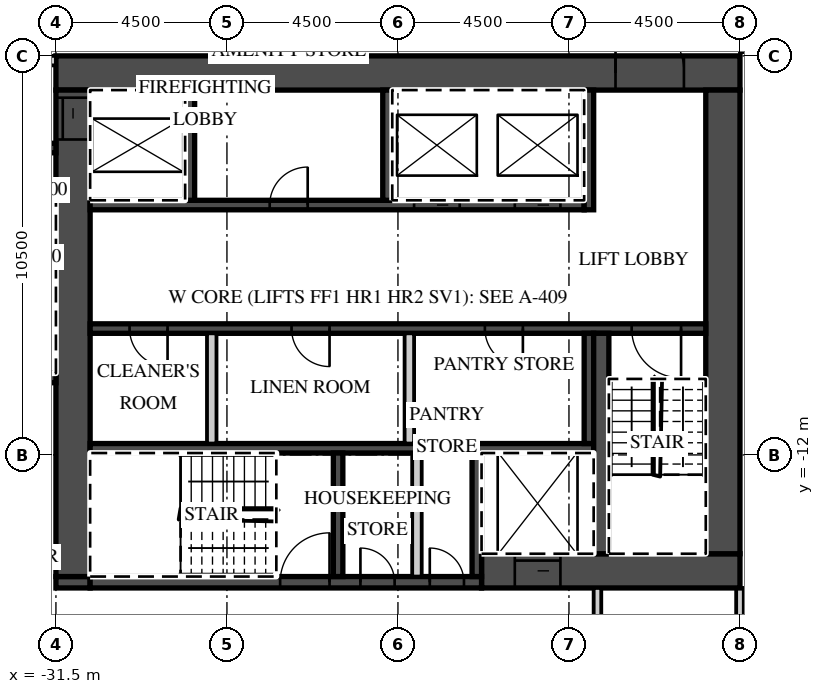
"""IFC4 building model, lengths in metres.
Left out: names, types, materials, properties, quantities, classifications, styles, units other than length and angle.
Written with IfcOpenShell. Run it as: python <this file> out.ifc"""

import sys

from ifc_helpers import new_model, si_unit, direction, frame, frame_2d, origin, place, context, subcontext, project, spatial, rectangle, extrude, element, fill, save


model = new_model("IFC4")
c1 = context("Model", 3, precision=1e-05, world=origin(), true_north=direction((0.0, 1.0)))
c2 = subcontext(c1, "Body", "Model", "MODEL_VIEW")
j1 = project(units=[si_unit("LENGTHUNIT", "METRE"), si_unit("PLANEANGLEUNIT", "RADIAN")], contexts=[c1])
p1 = place(None, origin())
s1 = spatial("IfcSite", under=j1, at=p1, CompositionType="ELEMENT")
p2 = place(p1, origin())
s2 = spatial("IfcBuilding", under=s1, at=p2, CompositionType="ELEMENT")
p3 = place(p2, frame((0.0, 0.0, 304.8)))
s3 = spatial("IfcBuildingStorey", under=s2, at=p3, CompositionType="ELEMENT", Elevation=304.8)
p4 = place(p3, frame((-13.5, -21.396, 0.0), z_axis=(0.0, 0.0, 1.0), x_axis=(0.0, 1.0, 0.0)))
e1 = element("IfcWall", 1, at=p4, inside=s3, PredefinedType="PARTITIONING", context=c2, shape_type="SweptSolid", body=[
    extrude(rectangle(XDim=5.896, YDim=0.2, at=frame_2d((2.948, 0.0))), origin(), (0.0, 0.0, 1.0), 2.9),
])
p5 = place(p3, frame((-13.5, -1.3, 0.0), z_axis=(0.0, 0.0, 1.0), x_axis=(1.0, 0.0, 0.0)))
e2 = element("IfcWall", 2, at=p5, inside=s3, PredefinedType="PARTITIONING", context=c2, shape_type="SweptSolid", body=[
    extrude(rectangle(XDim=50.293, YDim=0.2, at=frame_2d((25.146, 0.0))), origin(), (0.0, 0.0, 1.0), 2.9),
])
p6 = place(p5, frame((0.575, 0.0, 0.0)))
e3 = element("IfcOpeningElement", 3, at=p6, cuts=e2, PredefinedType="OPENING", context=c2, shape_type="SweptSolid", body=[
    extrude(rectangle(XDim=1.0, YDim=2.1, at=frame_2d((0.5, 1.05))), frame((0.0, 0.11, 0.0), z_axis=(0.0, -1.0, 0.0), x_axis=(1.0, 0.0, 0.0)), (0.0, 0.0, 1.0), 0.22),
])
p7 = place(p5, frame((6.938, 0.0, 0.0)))
e4 = element("IfcOpeningElement", 4, at=p7, cuts=e2, PredefinedType="OPENING", context=c2, shape_type="SweptSolid", body=[
    extrude(rectangle(XDim=1.2, YDim=2.1, at=frame_2d((0.6, 1.05))), frame((0.0, 0.11, 0.0), z_axis=(0.0, -1.0, 0.0), x_axis=(1.0, 0.0, 0.0)), (0.0, 0.0, 1.0), 0.22),
])
p8 = place(p5, frame((16.45, 0.0, 0.0)))
e5 = element("IfcOpeningElement", 5, at=p8, cuts=e2, PredefinedType="OPENING", context=c2, shape_type="SweptSolid", body=[
    extrude(rectangle(XDim=1.0, YDim=2.1, at=frame_2d((0.5, 1.05))), frame((0.0, 0.11, 0.0), z_axis=(0.0, -1.0, 0.0), x_axis=(1.0, 0.0, 0.0)), (0.0, 0.0, 1.0), 0.22),
])
p9 = place(p5, frame((20.925, 0.0, 0.0)))
e6 = element("IfcOpeningElement", 6, at=p9, cuts=e2, PredefinedType="OPENING", context=c2, shape_type="SweptSolid", body=[
    extrude(rectangle(XDim=1.0, YDim=2.1, at=frame_2d((0.5, 1.05))), frame((0.0, 0.11, 0.0), z_axis=(0.0, -1.0, 0.0), x_axis=(1.0, 0.0, 0.0)), (0.0, 0.0, 1.0), 0.22),
])
p10 = place(p5, frame((24.938, 0.0, 0.0)))
e7 = element("IfcOpeningElement", 7, at=p10, cuts=e2, PredefinedType="OPENING", context=c2, shape_type="SweptSolid", body=[
    extrude(rectangle(XDim=1.2, YDim=2.1, at=frame_2d((0.6, 1.05))), frame((0.0, 0.11, 0.0), z_axis=(0.0, -1.0, 0.0), x_axis=(1.0, 0.0, 0.0)), (0.0, 0.0, 1.0), 0.22),
])
p11 = place(p5, frame((32.075, 0.0, 0.0)))
e8 = element("IfcOpeningElement", 8, at=p11, cuts=e2, PredefinedType="OPENING", context=c2, shape_type="SweptSolid", body=[
    extrude(rectangle(XDim=1.0, YDim=2.1, at=frame_2d((0.5, 1.05))), frame((0.0, 0.11, 0.0), z_axis=(0.0, -1.0, 0.0), x_axis=(1.0, 0.0, 0.0)), (0.0, 0.0, 1.0), 0.22),
])
p12 = place(p5, frame((38.925, 0.0, 0.0)))
e9 = element("IfcOpeningElement", 9, at=p12, cuts=e2, PredefinedType="OPENING", context=c2, shape_type="SweptSolid", body=[
    extrude(rectangle(XDim=1.0, YDim=2.1, at=frame_2d((0.5, 1.05))), frame((0.0, 0.11, 0.0), z_axis=(0.0, -1.0, 0.0), x_axis=(1.0, 0.0, 0.0)), (0.0, 0.0, 1.0), 0.22),
])
p13 = place(p5, frame((45.862, 0.0, 0.0)))
e10 = element("IfcOpeningElement", 10, at=p13, cuts=e2, PredefinedType="OPENING", context=c2, shape_type="SweptSolid", body=[
    extrude(rectangle(XDim=1.2, YDim=2.1, at=frame_2d((0.6, 1.05))), frame((0.0, 0.11, 0.0), z_axis=(0.0, -1.0, 0.0), x_axis=(1.0, 0.0, 0.0)), (0.0, 0.0, 1.0), 0.22),
])
p14 = place(p3, frame((-31.5, -1.95, 0.0), z_axis=(0.0, 0.0, 1.0), x_axis=(1.0, 0.0, 0.0)))
e11 = element("IfcWall", 11, at=p14, inside=s3, PredefinedType="SHEAR", context=c2, shape_type="SweptSolid", body=[
    extrude(rectangle(XDim=18.0, YDim=0.9, at=frame_2d((9.0, 0.0))), origin(), (0.0, 0.0, 1.0), 2.9),
])
p15 = place(p14, frame((14.725, 0.0, 0.0)))
e12 = element("IfcOpeningElement", 12, at=p15, cuts=e11, PredefinedType="OPENING", context=c2, shape_type="SweptSolid", body=[
    extrude(rectangle(XDim=1.8, YDim=2.1, at=frame_2d((0.9, 1.05))), frame((0.0, 0.46, 0.0), z_axis=(0.0, -1.0, 0.0), x_axis=(1.0, 0.0, 0.0)), (0.0, 0.0, 1.0), 0.92),
])
p16 = place(p3, frame((-20.3, -15.05, 0.0), z_axis=(0.0, 0.0, 1.0), x_axis=(1.0, 0.0, 0.0)))
e13 = element("IfcWall", 13, at=p16, inside=s3, PredefinedType="SHEAR", context=c2, shape_type="SweptSolid", body=[
    extrude(rectangle(XDim=6.8, YDim=0.9, at=frame_2d((3.4, 0.0))), origin(), (0.0, 0.0, 1.0), 2.9),
])
p17 = place(p16, frame((0.875, 0.0, 0.0)))
e14 = element("IfcOpeningElement", 14, at=p17, cuts=e13, PredefinedType="OPENING", context=c2, shape_type="SweptSolid", body=[
    extrude(rectangle(XDim=1.2, YDim=2.1, at=frame_2d((0.6, 1.05))), frame((0.0, 0.46, 0.0), z_axis=(0.0, -1.0, 0.0), x_axis=(1.0, 0.0, 0.0)), (0.0, 0.0, 1.0), 0.92),
])
p18 = place(p3, frame((-31.5, -15.35, 0.0), z_axis=(0.0, 0.0, 1.0), x_axis=(1.0, 0.0, 0.0)))
e15 = element("IfcWall", 15, at=p18, inside=s3, PredefinedType="SHEAR", context=c2, shape_type="SweptSolid", body=[
    extrude(rectangle(XDim=0.9, YDim=0.3, at=frame_2d((0.45, 0.0))), origin(), (0.0, 0.0, 1.0), 2.9),
])
p19 = place(p3, frame((-30.6, -15.35, 0.0), z_axis=(0.0, 0.0, 1.0), x_axis=(1.0, 0.0, 0.0)))
e16 = element("IfcWall", 16, at=p19, inside=s3, PredefinedType="SHEAR", context=c2, shape_type="SweptSolid", body=[
    extrude(rectangle(XDim=10.3, YDim=0.3, at=frame_2d((5.15, 0.0))), origin(), (0.0, 0.0, 1.0), 2.9),
])
p20 = place(p19, frame((5.0, 0.0, 0.0)))
e17 = element("IfcOpeningElement", 17, at=p20, cuts=e16, PredefinedType="OPENING", context=c2, shape_type="SweptSolid", body=[
    extrude(rectangle(XDim=1.3, YDim=2.1, at=frame_2d((0.65, 1.05))), frame((0.0, 0.16, 0.0), z_axis=(0.0, -1.0, 0.0), x_axis=(1.0, 0.0, 0.0)), (0.0, 0.0, 1.0), 0.32),
])
p21 = place(p19, frame((7.113, 0.0, 0.0)))
e18 = element("IfcOpeningElement", 18, at=p21, cuts=e16, PredefinedType="OPENING", context=c2, shape_type="SweptSolid", body=[
    extrude(rectangle(XDim=0.9, YDim=2.1, at=frame_2d((0.45, 1.05))), frame((0.0, 0.16, 0.0), z_axis=(0.0, -1.0, 0.0), x_axis=(1.0, 0.0, 0.0)), (0.0, 0.0, 1.0), 0.32),
])
p22 = place(p19, frame((8.938, 0.0, 0.0)))
e19 = element("IfcOpeningElement", 19, at=p22, cuts=e16, PredefinedType="OPENING", context=c2, shape_type="SweptSolid", body=[
    extrude(rectangle(XDim=0.9, YDim=2.1, at=frame_2d((0.45, 1.05))), frame((0.0, 0.16, 0.0), z_axis=(0.0, -1.0, 0.0), x_axis=(1.0, 0.0, 0.0)), (0.0, 0.0, 1.0), 0.32),
])
p23 = place(p3, frame((-31.05, -15.2, 0.0), z_axis=(0.0, 0.0, 1.0), x_axis=(0.0, 1.0, 0.0)))
e20 = element("IfcWall", 20, at=p23, inside=s3, PredefinedType="SHEAR", context=c2, shape_type="SweptSolid", body=[
    extrude(rectangle(XDim=12.8, YDim=0.9, at=frame_2d((6.4, 0.0))), origin(), (0.0, 0.0, 1.0), 2.9),
])
p24 = place(p23, frame((11.5, 0.0, 0.0)))
e21 = element("IfcOpeningElement", 21, at=p24, cuts=e20, PredefinedType="OPENING", context=c2, shape_type="SweptSolid", body=[
    extrude(rectangle(XDim=1.1, YDim=2.1, at=frame_2d((0.55, 1.05))), frame((0.0, 0.46, 0.0), z_axis=(0.0, -1.0, 0.0), x_axis=(1.0, 0.0, 0.0)), (0.0, 0.0, 1.0), 0.92),
])
p25 = place(p3, frame((-13.95, -14.6, 0.0), z_axis=(0.0, 0.0, 1.0), x_axis=(0.0, 1.0, 0.0)))
e22 = element("IfcWall", 22, at=p25, inside=s3, PredefinedType="SHEAR", context=c2, shape_type="SweptSolid", body=[
    extrude(rectangle(XDim=12.2, YDim=0.9, at=frame_2d((6.1, 0.0))), origin(), (0.0, 0.0, 1.0), 2.9),
])
p26 = place(p3, frame((-30.6, -5.425, 0.0), z_axis=(0.0, 0.0, 1.0), x_axis=(1.0, 0.0, 0.0)))
e23 = element("IfcWall", 23, at=p26, inside=s3, PredefinedType="SHEAR", context=c2, shape_type="SweptSolid", body=[
    extrude(rectangle(XDim=13.0, YDim=0.25, at=frame_2d((6.5, 0.0))), origin(), (0.0, 0.0, 1.0), 2.9),
])
p27 = place(p26, frame((8.525, 0.0, 0.0)))
e24 = element("IfcOpeningElement", 24, at=p27, cuts=e23, PredefinedType="OPENING", context=c2, shape_type="SweptSolid", body=[
    extrude(rectangle(XDim=1.2, YDim=2.1, at=frame_2d((0.6, 1.05))), frame((0.0, 0.135, 0.0), z_axis=(0.0, -1.0, 0.0), x_axis=(1.0, 0.0, 0.0)), (0.0, 0.0, 1.0), 0.27),
])
p28 = place(p26, frame((11.175, 0.0, 0.0)))
e25 = element("IfcOpeningElement", 25, at=p28, cuts=e23, PredefinedType="OPENING", context=c2, shape_type="SweptSolid", body=[
    extrude(rectangle(XDim=1.2, YDim=2.1, at=frame_2d((0.6, 1.05))), frame((0.0, 0.135, 0.0), z_axis=(0.0, -1.0, 0.0), x_axis=(1.0, 0.0, 0.0)), (0.0, 0.0, 1.0), 0.27),
])
p29 = place(p26, frame((4.725, 0.0, 0.0)))
e26 = element("IfcOpeningElement", 26, at=p29, cuts=e23, PredefinedType="OPENING", context=c2, shape_type="SweptSolid", body=[
    extrude(rectangle(XDim=1.0, YDim=2.1, at=frame_2d((0.5, 1.05))), frame((0.0, 0.135, 0.0), z_axis=(0.0, -1.0, 0.0), x_axis=(1.0, 0.0, 0.0)), (0.0, 0.0, 1.0), 0.27),
])
p30 = place(p3, frame((-17.475, -5.55, 0.0), z_axis=(0.0, 0.0, 1.0), x_axis=(0.0, 1.0, 0.0)))
e27 = element("IfcWall", 27, at=p30, inside=s3, PredefinedType="SHEAR", context=c2, shape_type="SweptSolid", body=[
    extrude(rectangle(XDim=3.15, YDim=0.25, at=frame_2d((1.575, 0.0))), origin(), (0.0, 0.0, 1.0), 2.9),
])
for number, where, z_axis, x_axis in (
    (28, (-27.975, -5.3, 0.0), (0.0, 0.0, 1.0), (0.0, 1.0, 0.0)),
    (29, (-22.775, -5.3, 0.0), (0.0, 0.0, 1.0), (0.0, 1.0, 0.0)),
):
    element("IfcWall", number, at=place(p3, frame(where, z_axis=z_axis, x_axis=x_axis)), inside=s3, PredefinedType="SHEAR", context=c2, shape_type="SweptSolid", body=[
        extrude(rectangle(XDim=2.9, YDim=0.25, at=frame_2d((1.45, 0.0))), origin(), (0.0, 0.0, 1.0), 2.9),
    ])
p31 = place(p3, frame((-30.6, -8.675, 0.0), z_axis=(0.0, 0.0, 1.0), x_axis=(1.0, 0.0, 0.0)))
e30 = element("IfcWall", 30, at=p31, inside=s3, PredefinedType="SHEAR", context=c2, shape_type="SweptSolid", body=[
    extrude(rectangle(XDim=16.2, YDim=0.25, at=frame_2d((8.1, 0.0))), origin(), (0.0, 0.0, 1.0), 2.9),
])
p32 = place(p31, frame((14.25, 0.0, 0.0)))
e31 = element("IfcOpeningElement", 31, at=p32, cuts=e30, PredefinedType="OPENING", context=c2, shape_type="SweptSolid", body=[
    extrude(rectangle(XDim=1.3, YDim=2.1, at=frame_2d((0.65, 1.05))), frame((0.0, 0.135, 0.0), z_axis=(0.0, -1.0, 0.0), x_axis=(1.0, 0.0, 0.0)), (0.0, 0.0, 1.0), 0.27),
])
p33 = place(p31, frame((1.038, 0.0, 0.0)))
e32 = element("IfcOpeningElement", 32, at=p33, cuts=e30, PredefinedType="OPENING", context=c2, shape_type="SweptSolid", body=[
    extrude(rectangle(XDim=1.0, YDim=2.1, at=frame_2d((0.5, 1.05))), frame((0.0, 0.135, 0.0), z_axis=(0.0, -1.0, 0.0), x_axis=(1.0, 0.0, 0.0)), (0.0, 0.0, 1.0), 0.27),
])
p34 = place(p31, frame((5.3, 0.0, 0.0)))
e33 = element("IfcOpeningElement", 33, at=p34, cuts=e30, PredefinedType="OPENING", context=c2, shape_type="SweptSolid", body=[
    extrude(rectangle(XDim=1.0, YDim=2.1, at=frame_2d((0.5, 1.05))), frame((0.0, 0.135, 0.0), z_axis=(0.0, -1.0, 0.0), x_axis=(1.0, 0.0, 0.0)), (0.0, 0.0, 1.0), 0.27),
])
p35 = place(p31, frame((10.387, 0.0, 0.0)))
e34 = element("IfcOpeningElement", 34, at=p35, cuts=e30, PredefinedType="OPENING", context=c2, shape_type="SweptSolid", body=[
    extrude(rectangle(XDim=1.0, YDim=2.1, at=frame_2d((0.5, 1.05))), frame((0.0, 0.135, 0.0), z_axis=(0.0, -1.0, 0.0), x_axis=(1.0, 0.0, 0.0)), (0.0, 0.0, 1.0), 0.27),
])
p36 = place(p3, frame((-30.6, -11.825, 0.0), z_axis=(0.0, 0.0, 1.0), x_axis=(1.0, 0.0, 0.0)))
e35 = element("IfcWall", 35, at=p36, inside=s3, PredefinedType="SHEAR", context=c2, shape_type="SweptSolid", body=[
    extrude(rectangle(XDim=13.25, YDim=0.25, at=frame_2d((6.625, 0.0))), origin(), (0.0, 0.0, 1.0), 2.9),
])
p37 = place(p3, frame((-17.475, -11.7, 0.0), z_axis=(0.0, 0.0, 1.0), x_axis=(0.0, 1.0, 0.0)))
e36 = element("IfcWall", 36, at=p37, inside=s3, PredefinedType="SHEAR", context=c2, shape_type="SweptSolid", body=[
    extrude(rectangle(XDim=2.9, YDim=0.25, at=frame_2d((1.45, 0.0))), origin(), (0.0, 0.0, 1.0), 2.9),
])
for number, where, z_axis, x_axis in (
    (37, (-27.4, -11.7, 0.0), (0.0, 0.0, 1.0), (0.0, 1.0, 0.0)),
    (38, (-22.2, -11.7, 0.0), (0.0, 0.0, 1.0), (0.0, 1.0, 0.0)),
):
    element("IfcWall", number, at=place(p3, frame(where, z_axis=z_axis, x_axis=x_axis)), inside=s3, PredefinedType="PARTITIONING", context=c2, shape_type="SweptSolid", body=[
        extrude(rectangle(XDim=2.9, YDim=0.25, at=frame_2d((1.45, 0.0))), origin(), (0.0, 0.0, 1.0), 2.9),
    ])
p38 = place(p3, frame((-17.15, -14.6, 0.0), z_axis=(0.0, 0.0, 1.0), x_axis=(0.0, 1.0, 0.0)))
e39 = element("IfcWall", 39, at=p38, inside=s3, PredefinedType="SHEAR", context=c2, shape_type="SweptSolid", body=[
    extrude(rectangle(XDim=5.8, YDim=0.4, at=frame_2d((2.9, 0.0))), origin(), (0.0, 0.0, 1.0), 2.9),
])
for number, where, z_axis, x_axis in (
    (40, (-20.425, -15.2, 0.0), (0.0, 0.0, 1.0), (0.0, 1.0, 0.0)),
    (41, (-24.075, -15.2, 0.0), (0.0, 0.0, 1.0), (0.0, 1.0, 0.0)),
):
    element("IfcWall", number, at=place(p3, frame(where, z_axis=z_axis, x_axis=x_axis)), inside=s3, PredefinedType="SHEAR", context=c2, shape_type="SweptSolid", body=[
        extrude(rectangle(XDim=3.25, YDim=0.25, at=frame_2d((1.625, 0.0))), origin(), (0.0, 0.0, 1.0), 2.9),
    ])
p39 = place(p3, frame((-22.0, -15.2, 0.0), z_axis=(0.0, 0.0, 1.0), x_axis=(0.0, 1.0, 0.0)))
e42 = element("IfcWall", 42, at=p39, inside=s3, PredefinedType="PARTITIONING", context=c2, shape_type="SweptSolid", body=[
    extrude(rectangle(XDim=3.25, YDim=0.25, at=frame_2d((1.625, 0.0))), origin(), (0.0, 0.0, 1.0), 2.9),
])
p40 = place(p3, frame((-39.627, -1.625, 0.0), z_axis=(0.0, 0.0, 1.0), x_axis=(1.0, 0.0, 0.0)))
e43 = element("IfcWall", 43, at=p40, inside=s3, PredefinedType="PARTITIONING", context=c2, shape_type="SweptSolid", body=[
    extrude(rectangle(XDim=8.127, YDim=0.25, at=frame_2d((4.063, 0.0))), origin(), (0.0, 0.0, 1.0), 2.9),
])
p41 = place(p40, frame((6.202, 0.0, 0.0)))
e44 = element("IfcOpeningElement", 44, at=p41, cuts=e43, PredefinedType="OPENING", context=c2, shape_type="SweptSolid", body=[
    extrude(rectangle(XDim=1.3, YDim=2.1, at=frame_2d((0.65, 1.05))), frame((0.0, 0.135, 0.0), z_axis=(0.0, -1.0, 0.0), x_axis=(1.0, 0.0, 0.0)), (0.0, 0.0, 1.0), 0.27),
])
p42 = place(p40, frame((3.777, 0.0, 0.0)))
e45 = element("IfcOpeningElement", 45, at=p42, cuts=e43, PredefinedType="OPENING", context=c2, shape_type="SweptSolid", body=[
    extrude(rectangle(XDim=1.1, YDim=2.1, at=frame_2d((0.55, 1.05))), frame((0.0, 0.135, 0.0), z_axis=(0.0, -1.0, 0.0), x_axis=(1.0, 0.0, 0.0)), (0.0, 0.0, 1.0), 0.27),
])
p43 = place(p3, frame((-34.05, -3.925, 0.0), z_axis=(0.0, 0.0, 1.0), x_axis=(1.0, 0.0, 0.0)))
e46 = element("IfcWall", 46, at=p43, inside=s3, PredefinedType="SHEAR", context=c2, shape_type="SweptSolid", body=[
    extrude(rectangle(XDim=2.55, YDim=0.25, at=frame_2d((1.275, 0.0))), origin(), (0.0, 0.0, 1.0), 2.9),
])
p44 = place(p43, frame((0.625, 0.0, 0.0)))
e47 = element("IfcOpeningElement", 47, at=p44, cuts=e46, PredefinedType="OPENING", context=c2, shape_type="SweptSolid", body=[
    extrude(rectangle(XDim=1.3, YDim=2.1, at=frame_2d((0.65, 1.05))), frame((0.0, 0.135, 0.0), z_axis=(0.0, -1.0, 0.0), x_axis=(1.0, 0.0, 0.0)), (0.0, 0.0, 1.0), 0.27),
])
p45 = place(p3, frame((-34.05, -9.975, 0.0), z_axis=(0.0, 0.0, 1.0), x_axis=(1.0, 0.0, 0.0)))
e48 = element("IfcWall", 48, at=p45, inside=s3, PredefinedType="SHEAR", context=c2, shape_type="SweptSolid", body=[
    extrude(rectangle(XDim=2.55, YDim=0.25, at=frame_2d((1.275, 0.0))), origin(), (0.0, 0.0, 1.0), 2.9),
])
p46 = place(p3, frame((-17.25, -17.7, 0.0), z_axis=(0.0, 0.0, 1.0), x_axis=(0.0, 1.0, 0.0)))
e49 = element("IfcWall", 49, at=p46, inside=s3, PredefinedType="PARTITIONING", context=c2, shape_type="SweptSolid", body=[
    extrude(rectangle(XDim=2.2, YDim=0.2, at=frame_2d((1.1, 0.0))), origin(), (0.0, 0.0, 1.0), 2.9),
])
p47 = place(p27, origin())
e50 = element("IfcDoor", 50, at=p47, inside=s3, OperationType="SLIDING_TO_LEFT", PredefinedType="DOOR", context=c2, shape_type="SweptSolid", body=[
    extrude(rectangle(XDim=1.2, YDim=2.1, at=frame_2d((0.6, 1.05))), frame((0.0, 0.025, 0.0), z_axis=(0.0, -1.0, 0.0), x_axis=(1.0, 0.0, 0.0)), (0.0, 0.0, 1.0), 0.05),
])
fill(e24, e50)
p48 = place(p28, origin())
e51 = element("IfcDoor", 51, at=p48, inside=s3, OperationType="SLIDING_TO_RIGHT", PredefinedType="DOOR", context=c2, shape_type="SweptSolid", body=[
    extrude(rectangle(XDim=1.2, YDim=2.1, at=frame_2d((0.6, 1.05))), frame((0.0, 0.025, 0.0), z_axis=(0.0, -1.0, 0.0), x_axis=(1.0, 0.0, 0.0)), (0.0, 0.0, 1.0), 0.05),
])
fill(e25, e51)
p49 = place(p17, origin())
e52 = element("IfcDoor", 52, at=p49, inside=s3, OperationType="SLIDING_TO_LEFT", PredefinedType="DOOR", context=c2, shape_type="SweptSolid", body=[
    extrude(rectangle(XDim=1.2, YDim=2.1, at=frame_2d((0.6, 1.05))), frame((0.0, 0.025, 0.0), z_axis=(0.0, -1.0, 0.0), x_axis=(1.0, 0.0, 0.0)), (0.0, 0.0, 1.0), 0.05),
])
fill(e14, e52)
p50 = place(p24, origin())
e53 = element("IfcDoor", 53, at=p50, inside=s3, OperationType="SLIDING_TO_RIGHT", PredefinedType="DOOR", context=c2, shape_type="SweptSolid", body=[
    extrude(rectangle(XDim=1.1, YDim=2.1, at=frame_2d((0.55, 1.05))), frame((0.0, 0.025, 0.0), z_axis=(0.0, -1.0, 0.0), x_axis=(1.0, 0.0, 0.0)), (0.0, 0.0, 1.0), 0.05),
])
fill(e21, e53)
p51 = place(p15, origin())
e54 = element("IfcDoor", 54, at=p51, inside=s3, OperationType="DOUBLE_DOOR_DOUBLE_SWING", PredefinedType="DOOR", context=c2, shape_type="SweptSolid", body=[
    extrude(rectangle(XDim=1.8, YDim=2.1, at=frame_2d((0.9, 1.05))), frame((0.0, 0.025, 0.0), z_axis=(0.0, -1.0, 0.0), x_axis=(1.0, 0.0, 0.0)), (0.0, 0.0, 1.0), 0.05),
])
fill(e12, e54)
p52 = place(p32, origin())
e55 = element("IfcDoor", 55, at=p52, inside=s3, OperationType="SINGLE_SWING_RIGHT", PredefinedType="DOOR", context=c2, shape_type="SweptSolid", body=[
    extrude(rectangle(XDim=1.3, YDim=2.1, at=frame_2d((0.65, 1.05))), frame((0.0, 0.025, 0.0), z_axis=(0.0, -1.0, 0.0), x_axis=(1.0, 0.0, 0.0)), (0.0, 0.0, 1.0), 0.05),
])
fill(e31, e55)
p53 = place(p20, origin())
e56 = element("IfcDoor", 56, at=p53, inside=s3, OperationType="SINGLE_SWING_RIGHT", PredefinedType="DOOR", context=c2, shape_type="SweptSolid", body=[
    extrude(rectangle(XDim=1.3, YDim=2.1, at=frame_2d((0.65, 1.05))), frame((0.0, 0.025, 0.0), z_axis=(0.0, -1.0, 0.0), x_axis=(1.0, 0.0, 0.0)), (0.0, 0.0, 1.0), 0.05),
])
fill(e17, e56)
p54 = place(p21, origin())
e57 = element("IfcDoor", 57, at=p54, inside=s3, OperationType="SINGLE_SWING_LEFT", PredefinedType="DOOR", context=c2, shape_type="SweptSolid", body=[
    extrude(rectangle(XDim=0.9, YDim=2.1, at=frame_2d((0.45, 1.05))), frame((0.0, 0.025, 0.0), z_axis=(0.0, -1.0, 0.0), x_axis=(1.0, 0.0, 0.0)), (0.0, 0.0, 1.0), 0.05),
])
fill(e18, e57)
p55 = place(p22, origin())
e58 = element("IfcDoor", 58, at=p55, inside=s3, OperationType="SINGLE_SWING_LEFT", PredefinedType="DOOR", context=c2, shape_type="SweptSolid", body=[
    extrude(rectangle(XDim=0.9, YDim=2.1, at=frame_2d((0.45, 1.05))), frame((0.0, 0.025, 0.0), z_axis=(0.0, -1.0, 0.0), x_axis=(1.0, 0.0, 0.0)), (0.0, 0.0, 1.0), 0.05),
])
fill(e19, e58)
p56 = place(p33, origin())
e59 = element("IfcDoor", 59, at=p56, inside=s3, OperationType="SINGLE_SWING_RIGHT", PredefinedType="DOOR", context=c2, shape_type="SweptSolid", body=[
    extrude(rectangle(XDim=1.0, YDim=2.1, at=frame_2d((0.5, 1.05))), frame((0.0, 0.025, 0.0), z_axis=(0.0, -1.0, 0.0), x_axis=(1.0, 0.0, 0.0)), (0.0, 0.0, 1.0), 0.05),
])
fill(e32, e59)
p57 = place(p34, origin())
e60 = element("IfcDoor", 60, at=p57, inside=s3, OperationType="SINGLE_SWING_RIGHT", PredefinedType="DOOR", context=c2, shape_type="SweptSolid", body=[
    extrude(rectangle(XDim=1.0, YDim=2.1, at=frame_2d((0.5, 1.05))), frame((0.0, 0.025, 0.0), z_axis=(0.0, -1.0, 0.0), x_axis=(1.0, 0.0, 0.0)), (0.0, 0.0, 1.0), 0.05),
])
fill(e33, e60)
p58 = place(p35, origin())
e61 = element("IfcDoor", 61, at=p58, inside=s3, OperationType="SINGLE_SWING_RIGHT", PredefinedType="DOOR", context=c2, shape_type="SweptSolid", body=[
    extrude(rectangle(XDim=1.0, YDim=2.1, at=frame_2d((0.5, 1.05))), frame((0.0, 0.025, 0.0), z_axis=(0.0, -1.0, 0.0), x_axis=(1.0, 0.0, 0.0)), (0.0, 0.0, 1.0), 0.05),
])
fill(e34, e61)
p59 = place(p29, origin())
e62 = element("IfcDoor", 62, at=p59, inside=s3, OperationType="SINGLE_SWING_RIGHT", PredefinedType="DOOR", context=c2, shape_type="SweptSolid", body=[
    extrude(rectangle(XDim=1.0, YDim=2.1, at=frame_2d((0.5, 1.05))), frame((0.0, 0.025, 0.0), z_axis=(0.0, -1.0, 0.0), x_axis=(1.0, 0.0, 0.0)), (0.0, 0.0, 1.0), 0.05),
])
fill(e26, e62)
save(model, sys.argv[1])
